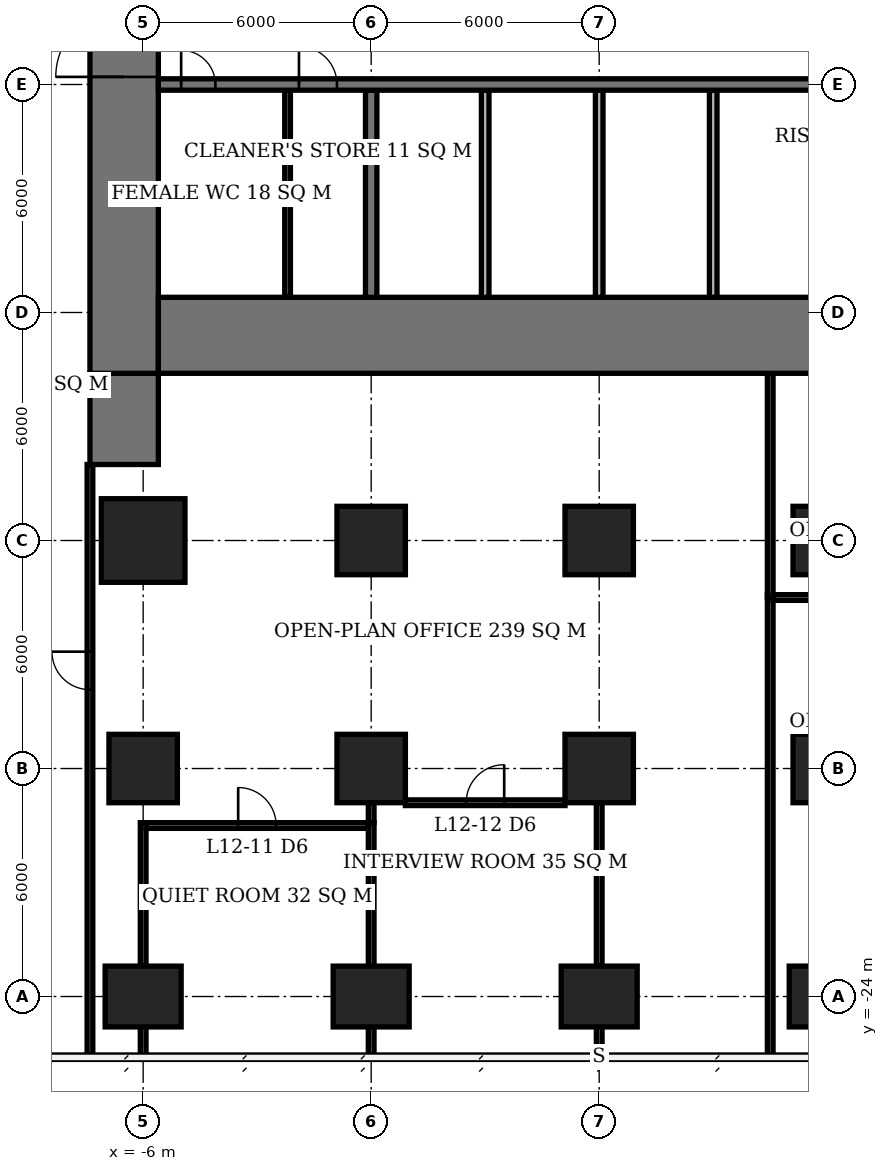
"""IFC4 building model, lengths in metres.
Left out: names, types, materials, properties, quantities, classifications, styles, units other than length and angle.
Written with IfcOpenShell. Run it as: python <this file> out.ifc"""

import sys

from ifc_helpers import new_model, si_unit, direction, frame, frame_2d, origin, origin_2d, place, context, subcontext, project, spatial, rectangle, extrude, element, fill, save


model = new_model("IFC4")
c1 = context("Model", 3, precision=1e-05, world=origin(), true_north=direction((0.0, 1.0)))
c2 = subcontext(c1, "Body", "Model", "MODEL_VIEW")
j1 = project(units=[si_unit("LENGTHUNIT", "METRE"), si_unit("PLANEANGLEUNIT", "RADIAN")], contexts=[c1])
p1 = place(None, origin())
s1 = spatial("IfcSite", under=j1, at=p1, CompositionType="ELEMENT")
p2 = place(p1, origin())
s2 = spatial("IfcBuilding", under=s1, at=p2, CompositionType="ELEMENT")
p3 = place(p2, frame((0.0, 0.0, 53.3)))
s3 = spatial("IfcBuildingStorey", under=s2, at=p3, CompositionType="ELEMENT", Elevation=53.3)
p4 = place(p3, frame((-6.0, -24.0, 0.0), z_axis=(0.0, 0.0, 1.0), x_axis=(1.0, 0.0, 0.0)))
e1 = element("IfcColumn", 1, at=p4, inside=s3, PredefinedType="COLUMN", context=c2, shape_type="SweptSolid", body=[
    extrude(rectangle(XDim=2.0, YDim=1.6, at=origin_2d()), origin(), (0.0, 0.0, 1.0), 3.9),
])
p5 = place(p3, frame((-6.0, -18.0, 0.0), z_axis=(0.0, 0.0, 1.0), x_axis=(1.0, 0.0, 0.0)))
e2 = element("IfcColumn", 2, at=p5, inside=s3, PredefinedType="COLUMN", context=c2, shape_type="SweptSolid", body=[
    extrude(rectangle(XDim=1.8, YDim=1.8, at=origin_2d()), origin(), (0.0, 0.0, 1.0), 3.9),
])
p6 = place(p3, frame((-6.0, -12.0, 0.0), z_axis=(0.0, 0.0, 1.0), x_axis=(1.0, 0.0, 0.0)))
e3 = element("IfcColumn", 3, at=p6, inside=s3, PredefinedType="COLUMN", context=c2, shape_type="SweptSolid", body=[
    extrude(rectangle(XDim=2.2, YDim=2.2, at=origin_2d()), origin(), (0.0, 0.0, 1.0), 3.9),
])
p7 = place(p3, frame((0.0, -24.0, 0.0), z_axis=(0.0, 0.0, 1.0), x_axis=(1.0, 0.0, 0.0)))
e4 = element("IfcColumn", 4, at=p7, inside=s3, PredefinedType="COLUMN", context=c2, shape_type="SweptSolid", body=[
    extrude(rectangle(XDim=2.0, YDim=1.6, at=origin_2d()), origin(), (0.0, 0.0, 1.0), 3.9),
])
for number, where, z_axis, x_axis in (
    (5, (0.0, -18.0, 0.0), (0.0, 0.0, 1.0), (1.0, 0.0, 0.0)),
    (6, (0.0, -12.0, 0.0), (0.0, 0.0, 1.0), (1.0, 0.0, 0.0)),
):
    element("IfcColumn", number, at=place(p3, frame(where, z_axis=z_axis, x_axis=x_axis)), inside=s3, PredefinedType="COLUMN", context=c2, shape_type="SweptSolid", body=[
        extrude(rectangle(XDim=1.8, YDim=1.8, at=origin_2d()), origin(), (0.0, 0.0, 1.0), 3.9),
    ])
p8 = place(p3, frame((6.0, -24.0, 0.0), z_axis=(0.0, 0.0, 1.0), x_axis=(1.0, 0.0, 0.0)))
e7 = element("IfcColumn", 7, at=p8, inside=s3, PredefinedType="COLUMN", context=c2, shape_type="SweptSolid", body=[
    extrude(rectangle(XDim=2.0, YDim=1.6, at=origin_2d()), origin(), (0.0, 0.0, 1.0), 3.9),
])
for number, where, z_axis, x_axis in (
    (8, (6.0, -18.0, 0.0), (0.0, 0.0, 1.0), (1.0, 0.0, 0.0)),
    (9, (6.0, -12.0, 0.0), (0.0, 0.0, 1.0), (1.0, 0.0, 0.0)),
):
    element("IfcColumn", number, at=place(p3, frame(where, z_axis=z_axis, x_axis=x_axis)), inside=s3, PredefinedType="COLUMN", context=c2, shape_type="SweptSolid", body=[
        extrude(rectangle(XDim=1.8, YDim=1.8, at=origin_2d()), origin(), (0.0, 0.0, 1.0), 3.9),
    ])
p9 = place(p3, frame((12.0, -24.0, 0.0), z_axis=(0.0, 0.0, 1.0), x_axis=(1.0, 0.0, 0.0)))
e10 = element("IfcColumn", 10, at=p9, inside=s3, PredefinedType="COLUMN", context=c2, shape_type="SweptSolid", body=[
    extrude(rectangle(XDim=2.0, YDim=1.6, at=origin_2d()), origin(), (0.0, 0.0, 1.0), 3.9),
])
for number, where, z_axis, x_axis in (
    (11, (12.0, -18.0, 0.0), (0.0, 0.0, 1.0), (1.0, 0.0, 0.0)),
    (12, (12.0, -12.0, 0.0), (0.0, 0.0, 1.0), (1.0, 0.0, 0.0)),
):
    element("IfcColumn", number, at=place(p3, frame(where, z_axis=z_axis, x_axis=x_axis)), inside=s3, PredefinedType="COLUMN", context=c2, shape_type="SweptSolid", body=[
        extrude(rectangle(XDim=1.8, YDim=1.8, at=origin_2d()), origin(), (0.0, 0.0, 1.0), 3.9),
    ])
p10 = place(p3, frame((-5.6, -6.6, 0.0), z_axis=(0.0, 0.0, 1.0), x_axis=(1.0, 0.0, 0.0)))
e13 = element("IfcWall", 13, at=p10, inside=s3, PredefinedType="SHEAR", context=c2, shape_type="SweptSolid", body=[
    extrude(rectangle(XDim=23.2, YDim=2.0, at=frame_2d((11.6, 0.0))), origin(), (0.0, 0.0, 1.0), 3.9),
])
p11 = place(p3, frame((-6.5, -7.6, 0.0), z_axis=(0.0, 0.0, 1.0), x_axis=(0.0, 1.0, 0.0)))
e14 = element("IfcWall", 14, at=p11, inside=s3, PredefinedType="SHEAR", context=c2, shape_type="SweptSolid", body=[
    extrude(rectangle(XDim=21.2, YDim=1.8, at=frame_2d((10.6, 0.0))), origin(), (0.0, 0.0, 1.0), 3.9),
])
p12 = place(p11, frame((7.8, 0.0, 0.0)))
e15 = element("IfcOpeningElement", 15, at=p12, cuts=e14, PredefinedType="OPENING", context=c2, shape_type="SweptSolid", body=[
    extrude(rectangle(XDim=1.8, YDim=2.4, at=frame_2d((0.9, 1.2))), frame((0.0, 0.91, 0.0), z_axis=(0.0, -1.0, 0.0), x_axis=(1.0, 0.0, 0.0)), (0.0, 0.0, 1.0), 1.82),
])
p13 = place(p3, frame((-6.5, -10.0, 0.0), z_axis=(0.0, 0.0, 1.0), x_axis=(0.0, 1.0, 0.0)))
e16 = element("IfcWall", 16, at=p13, inside=s3, PredefinedType="SHEAR", context=c2, shape_type="SweptSolid", body=[
    extrude(rectangle(XDim=2.4, YDim=1.8, at=frame_2d((1.2, 0.0))), origin(), (0.0, 0.0, 1.0), 3.9),
])
p14 = place(p3, frame((-5.6, 0.0, 0.0), z_axis=(0.0, 0.0, 1.0), x_axis=(1.0, 0.0, 0.0)))
e17 = element("IfcWall", 17, at=p14, inside=s3, PredefinedType="SHEAR", context=c2, shape_type="SweptSolid", body=[
    extrude(rectangle(XDim=17.75, YDim=0.3, at=frame_2d((8.875, 0.0))), origin(), (0.0, 0.0, 1.0), 3.9),
])
p15 = place(p14, frame((0.6, 0.0, 0.0)))
e18 = element("IfcOpeningElement", 18, at=p15, cuts=e17, PredefinedType="OPENING", context=c2, shape_type="SweptSolid", body=[
    extrude(rectangle(XDim=0.9, YDim=2.1, at=frame_2d((0.45, 1.05))), frame((0.0, 0.16, 0.0), z_axis=(0.0, -1.0, 0.0), x_axis=(1.0, 0.0, 0.0)), (0.0, 0.0, 1.0), 0.32),
])
p16 = place(p14, frame((3.7, 0.0, 0.0)))
e19 = element("IfcOpeningElement", 19, at=p16, cuts=e17, PredefinedType="OPENING", context=c2, shape_type="SweptSolid", body=[
    extrude(rectangle(XDim=1.0, YDim=2.1, at=frame_2d((0.5, 1.05))), frame((0.0, 0.16, 0.0), z_axis=(0.0, -1.0, 0.0), x_axis=(1.0, 0.0, 0.0)), (0.0, 0.0, 1.0), 0.32),
])
p17 = place(p3, frame((0.0, -5.6, 0.0), z_axis=(0.0, 0.0, 1.0), x_axis=(0.0, 1.0, 0.0)))
e20 = element("IfcWall", 20, at=p17, inside=s3, PredefinedType="SHEAR", context=c2, shape_type="SweptSolid", body=[
    extrude(rectangle(XDim=5.45, YDim=0.3, at=frame_2d((2.725, 0.0))), origin(), (0.0, 0.0, 1.0), 3.9),
])
for number, where, z_axis, x_axis in (
    (21, (3.0, -5.6, 0.0), (0.0, 0.0, 1.0), (0.0, 1.0, 0.0)),
    (22, (6.0, -5.6, 0.0), (0.0, 0.0, 1.0), (0.0, 1.0, 0.0)),
    (23, (9.0, -5.6, 0.0), (0.0, 0.0, 1.0), (0.0, 1.0, 0.0)),
):
    element("IfcWall", number, at=place(p3, frame(where, z_axis=z_axis, x_axis=x_axis)), inside=s3, PredefinedType="SOLIDWALL", context=c2, shape_type="SweptSolid", body=[
        extrude(rectangle(XDim=5.45, YDim=0.2, at=frame_2d((2.725, 0.0))), origin(), (0.0, 0.0, 1.0), 3.9),
    ])
p18 = place(p3, frame((-2.2, -5.6, 0.0), z_axis=(0.0, 0.0, 1.0), x_axis=(0.0, 1.0, 0.0)))
e24 = element("IfcWall", 24, at=p18, inside=s3, PredefinedType="PLUMBINGWALL", context=c2, shape_type="SweptSolid", body=[
    extrude(rectangle(XDim=5.45, YDim=0.15, at=frame_2d((2.725, 0.0))), origin(), (0.0, 0.0, 1.0), 3.65),
])
p19 = place(p3, frame((-5.925, -19.5, 0.0), z_axis=(0.0, 0.0, 1.0), x_axis=(1.0, 0.0, 0.0)))
e25 = element("IfcWall", 25, at=p19, inside=s3, PredefinedType="PARTITIONING", context=c2, shape_type="SweptSolid", body=[
    extrude(rectangle(XDim=5.85, YDim=0.15, at=frame_2d((2.925, 0.0))), origin(), (0.0, 0.0, 1.0), 3.65),
])
p20 = place(p19, frame((2.425, 0.0, 0.0)))
e26 = element("IfcOpeningElement", 26, at=p20, cuts=e25, PredefinedType="OPENING", context=c2, shape_type="SweptSolid", body=[
    extrude(rectangle(XDim=1.0, YDim=2.1, at=frame_2d((0.5, 1.05))), frame((0.0, 0.085, 0.0), z_axis=(0.0, -1.0, 0.0), x_axis=(1.0, 0.0, 0.0)), (0.0, 0.0, 1.0), 0.17),
])
p21 = place(p3, frame((0.9, -18.9, 0.0), z_axis=(0.0, 0.0, 1.0), x_axis=(1.0, 0.0, 0.0)))
e27 = element("IfcWall", 27, at=p21, inside=s3, PredefinedType="PARTITIONING", context=c2, shape_type="SweptSolid", body=[
    extrude(rectangle(XDim=4.2, YDim=0.15, at=frame_2d((2.1, 0.0))), origin(), (0.0, 0.0, 1.0), 3.65),
])
p22 = place(p21, frame((1.6, 0.0, 0.0)))
e28 = element("IfcOpeningElement", 28, at=p22, cuts=e27, PredefinedType="OPENING", context=c2, shape_type="SweptSolid", body=[
    extrude(rectangle(XDim=1.0, YDim=2.1, at=frame_2d((0.5, 1.05))), frame((0.0, 0.085, 0.0), z_axis=(0.0, -1.0, 0.0), x_axis=(1.0, 0.0, 0.0)), (0.0, 0.0, 1.0), 0.17),
])
p23 = place(p3, frame((-6.0, -25.6, 0.0), z_axis=(0.0, 0.0, 1.0), x_axis=(0.0, 1.0, 0.0)))
e29 = element("IfcWall", 29, at=p23, inside=s3, PredefinedType="PARTITIONING", context=c2, shape_type="SweptSolid", body=[
    extrude(rectangle(XDim=0.8, YDim=0.15, at=frame_2d((0.4, 0.0))), origin(), (0.0, 0.0, 1.0), 3.65),
])
p24 = place(p3, frame((-6.0, -23.2, 0.0), z_axis=(0.0, 0.0, 1.0), x_axis=(0.0, 1.0, 0.0)))
e30 = element("IfcWall", 30, at=p24, inside=s3, PredefinedType="PARTITIONING", context=c2, shape_type="SweptSolid", body=[
    extrude(rectangle(XDim=3.775, YDim=0.15, at=frame_2d((1.887, 0.0))), origin(), (0.0, 0.0, 1.0), 3.65),
])
p25 = place(p3, frame((0.0, -25.6, 0.0), z_axis=(0.0, 0.0, 1.0), x_axis=(0.0, 1.0, 0.0)))
e31 = element("IfcWall", 31, at=p25, inside=s3, PredefinedType="PARTITIONING", context=c2, shape_type="SweptSolid", body=[
    extrude(rectangle(XDim=0.8, YDim=0.15, at=frame_2d((0.4, 0.0))), origin(), (0.0, 0.0, 1.0), 3.65),
])
p26 = place(p3, frame((0.0, -23.2, 0.0), z_axis=(0.0, 0.0, 1.0), x_axis=(0.0, 1.0, 0.0)))
e32 = element("IfcWall", 32, at=p26, inside=s3, PredefinedType="PARTITIONING", context=c2, shape_type="SweptSolid", body=[
    extrude(rectangle(XDim=3.775, YDim=0.15, at=frame_2d((1.887, 0.0))), origin(), (0.0, 0.0, 1.0), 3.65),
])
p27 = place(p3, frame((0.0, -19.425, 0.0), z_axis=(0.0, 0.0, 1.0), x_axis=(0.0, 1.0, 0.0)))
e33 = element("IfcWall", 33, at=p27, inside=s3, PredefinedType="PARTITIONING", context=c2, shape_type="SweptSolid", body=[
    extrude(rectangle(XDim=0.525, YDim=0.15, at=frame_2d((0.263, 0.0))), origin(), (0.0, 0.0, 1.0), 3.65),
])
p28 = place(p3, frame((6.0, -25.55, 0.0), z_axis=(0.0, 0.0, 1.0), x_axis=(0.0, 1.0, 0.0)))
e34 = element("IfcWall", 34, at=p28, inside=s3, PredefinedType="PARTITIONING", context=c2, shape_type="SweptSolid", body=[
    extrude(rectangle(XDim=0.75, YDim=0.15, at=frame_2d((0.375, 0.0))), origin(), (0.0, 0.0, 1.0), 3.65),
])
p29 = place(p3, frame((6.0, -23.2, 0.0), z_axis=(0.0, 0.0, 1.0), x_axis=(0.0, 1.0, 0.0)))
e35 = element("IfcWall", 35, at=p29, inside=s3, PredefinedType="PARTITIONING", context=c2, shape_type="SweptSolid", body=[
    extrude(rectangle(XDim=4.3, YDim=0.15, at=frame_2d((2.15, 0.0))), origin(), (0.0, 0.0, 1.0), 3.65),
])
p30 = place(p3, frame((-7.4, -25.6, 0.0), z_axis=(0.0, 0.0, 1.0), x_axis=(0.0, 1.0, 0.0)))
e36 = element("IfcWall", 36, at=p30, inside=s3, PredefinedType="PARTITIONING", context=c2, shape_type="SweptSolid", body=[
    extrude(rectangle(XDim=15.6, YDim=0.15, at=frame_2d((7.8, 0.0))), origin(), (0.0, 0.0, 1.0), 3.65),
])
p31 = place(p30, frame((9.675, 0.0, 0.0)))
e37 = element("IfcOpeningElement", 37, at=p31, cuts=e36, PredefinedType="OPENING", context=c2, shape_type="SweptSolid", body=[
    extrude(rectangle(XDim=1.0, YDim=2.1, at=frame_2d((0.5, 1.05))), frame((0.0, 0.085, 0.0), z_axis=(0.0, -1.0, 0.0), x_axis=(1.0, 0.0, 0.0)), (0.0, 0.0, 1.0), 0.17),
])
p32 = place(p3, frame((10.5, -25.6, 0.0), z_axis=(0.0, 0.0, 1.0), x_axis=(0.0, 1.0, 0.0)))
e38 = element("IfcWall", 38, at=p32, inside=s3, PredefinedType="PARTITIONING", context=c2, shape_type="SweptSolid", body=[
    extrude(rectangle(XDim=12.175, YDim=0.15, at=frame_2d((6.087, 0.0))), origin(), (0.0, 0.0, 1.0), 3.65),
])
p33 = place(p3, frame((10.5, -13.5, 0.0), z_axis=(0.0, 0.0, 1.0), x_axis=(0.0, 1.0, 0.0)))
e39 = element("IfcWall", 39, at=p33, inside=s3, PredefinedType="PARTITIONING", context=c2, shape_type="SweptSolid", body=[
    extrude(rectangle(XDim=5.9, YDim=0.15, at=frame_2d((2.95, 0.0))), origin(), (0.0, 0.0, 1.0), 3.65),
])
p34 = place(p3, frame((19.325, -13.5, 0.0), z_axis=(0.0, 0.0, 1.0), x_axis=(-1.0, 0.0, 0.0)))
e40 = element("IfcWall", 40, at=p34, inside=s3, PredefinedType="PARTITIONING", context=c2, shape_type="SweptSolid", body=[
    extrude(rectangle(XDim=8.75, YDim=0.15, at=frame_2d((4.375, 0.0))), origin(), (0.0, 0.0, 1.0), 3.65),
])
p35 = place(p34, frame((2.375, 0.0, 0.0)))
e41 = element("IfcOpeningElement", 41, at=p35, cuts=e40, PredefinedType="OPENING", context=c2, shape_type="SweptSolid", body=[
    extrude(rectangle(XDim=1.0, YDim=2.1, at=frame_2d((0.5, 1.05))), frame((0.0, 0.085, 0.0), z_axis=(0.0, -1.0, 0.0), x_axis=(1.0, 0.0, 0.0)), (0.0, 0.0, 1.0), 0.17),
])
p36 = place(p12, origin())
e42 = element("IfcDoor", 42, at=p36, inside=s3, OperationType="DOUBLE_DOOR_SINGLE_SWING", PredefinedType="DOOR", context=c2, shape_type="SweptSolid", body=[
    extrude(rectangle(XDim=1.8, YDim=2.4, at=frame_2d((0.9, 1.2))), frame((0.0, 0.025, 0.0), z_axis=(0.0, -1.0, 0.0), x_axis=(1.0, 0.0, 0.0)), (0.0, 0.0, 1.0), 0.05),
])
fill(e15, e42)
p37 = place(p15, origin())
e43 = element("IfcDoor", 43, at=p37, inside=s3, OperationType="SINGLE_SWING_LEFT", PredefinedType="DOOR", context=c2, shape_type="SweptSolid", body=[
    extrude(rectangle(XDim=0.9, YDim=2.1, at=frame_2d((0.45, 1.05))), frame((0.0, 0.025, 0.0), z_axis=(0.0, -1.0, 0.0), x_axis=(1.0, 0.0, 0.0)), (0.0, 0.0, 1.0), 0.05),
])
fill(e18, e43)
p38 = place(p16, origin())
e44 = element("IfcDoor", 44, at=p38, inside=s3, OperationType="SINGLE_SWING_LEFT", PredefinedType="DOOR", context=c2, shape_type="SweptSolid", body=[
    extrude(rectangle(XDim=1.0, YDim=2.1, at=frame_2d((0.5, 1.05))), frame((0.0, 0.025, 0.0), z_axis=(0.0, -1.0, 0.0), x_axis=(1.0, 0.0, 0.0)), (0.0, 0.0, 1.0), 0.05),
])
fill(e19, e44)
p39 = place(p20, origin())
e45 = element("IfcDoor", 45, at=p39, inside=s3, OperationType="SINGLE_SWING_LEFT", PredefinedType="DOOR", context=c2, shape_type="SweptSolid", body=[
    extrude(rectangle(XDim=1.0, YDim=2.1, at=frame_2d((0.5, 1.05))), frame((0.0, 0.025, 0.0), z_axis=(0.0, -1.0, 0.0), x_axis=(1.0, 0.0, 0.0)), (0.0, 0.0, 1.0), 0.05),
])
fill(e26, e45)
p40 = place(p22, origin())
e46 = element("IfcDoor", 46, at=p40, inside=s3, OperationType="SINGLE_SWING_RIGHT", PredefinedType="DOOR", context=c2, shape_type="SweptSolid", body=[
    extrude(rectangle(XDim=1.0, YDim=2.1, at=frame_2d((0.5, 1.05))), frame((0.0, 0.025, 0.0), z_axis=(0.0, -1.0, 0.0), x_axis=(1.0, 0.0, 0.0)), (0.0, 0.0, 1.0), 0.05),
])
fill(e28, e46)
p41 = place(p31, origin())
e47 = element("IfcDoor", 47, at=p41, inside=s3, OperationType="SINGLE_SWING_RIGHT", PredefinedType="DOOR", context=c2, shape_type="SweptSolid", body=[
    extrude(rectangle(XDim=1.0, YDim=2.1, at=frame_2d((0.5, 1.05))), frame((0.0, 0.025, 0.0), z_axis=(0.0, -1.0, 0.0), x_axis=(1.0, 0.0, 0.0)), (0.0, 0.0, 1.0), 0.05),
])
fill(e37, e47)
save(model, sys.argv[1])
